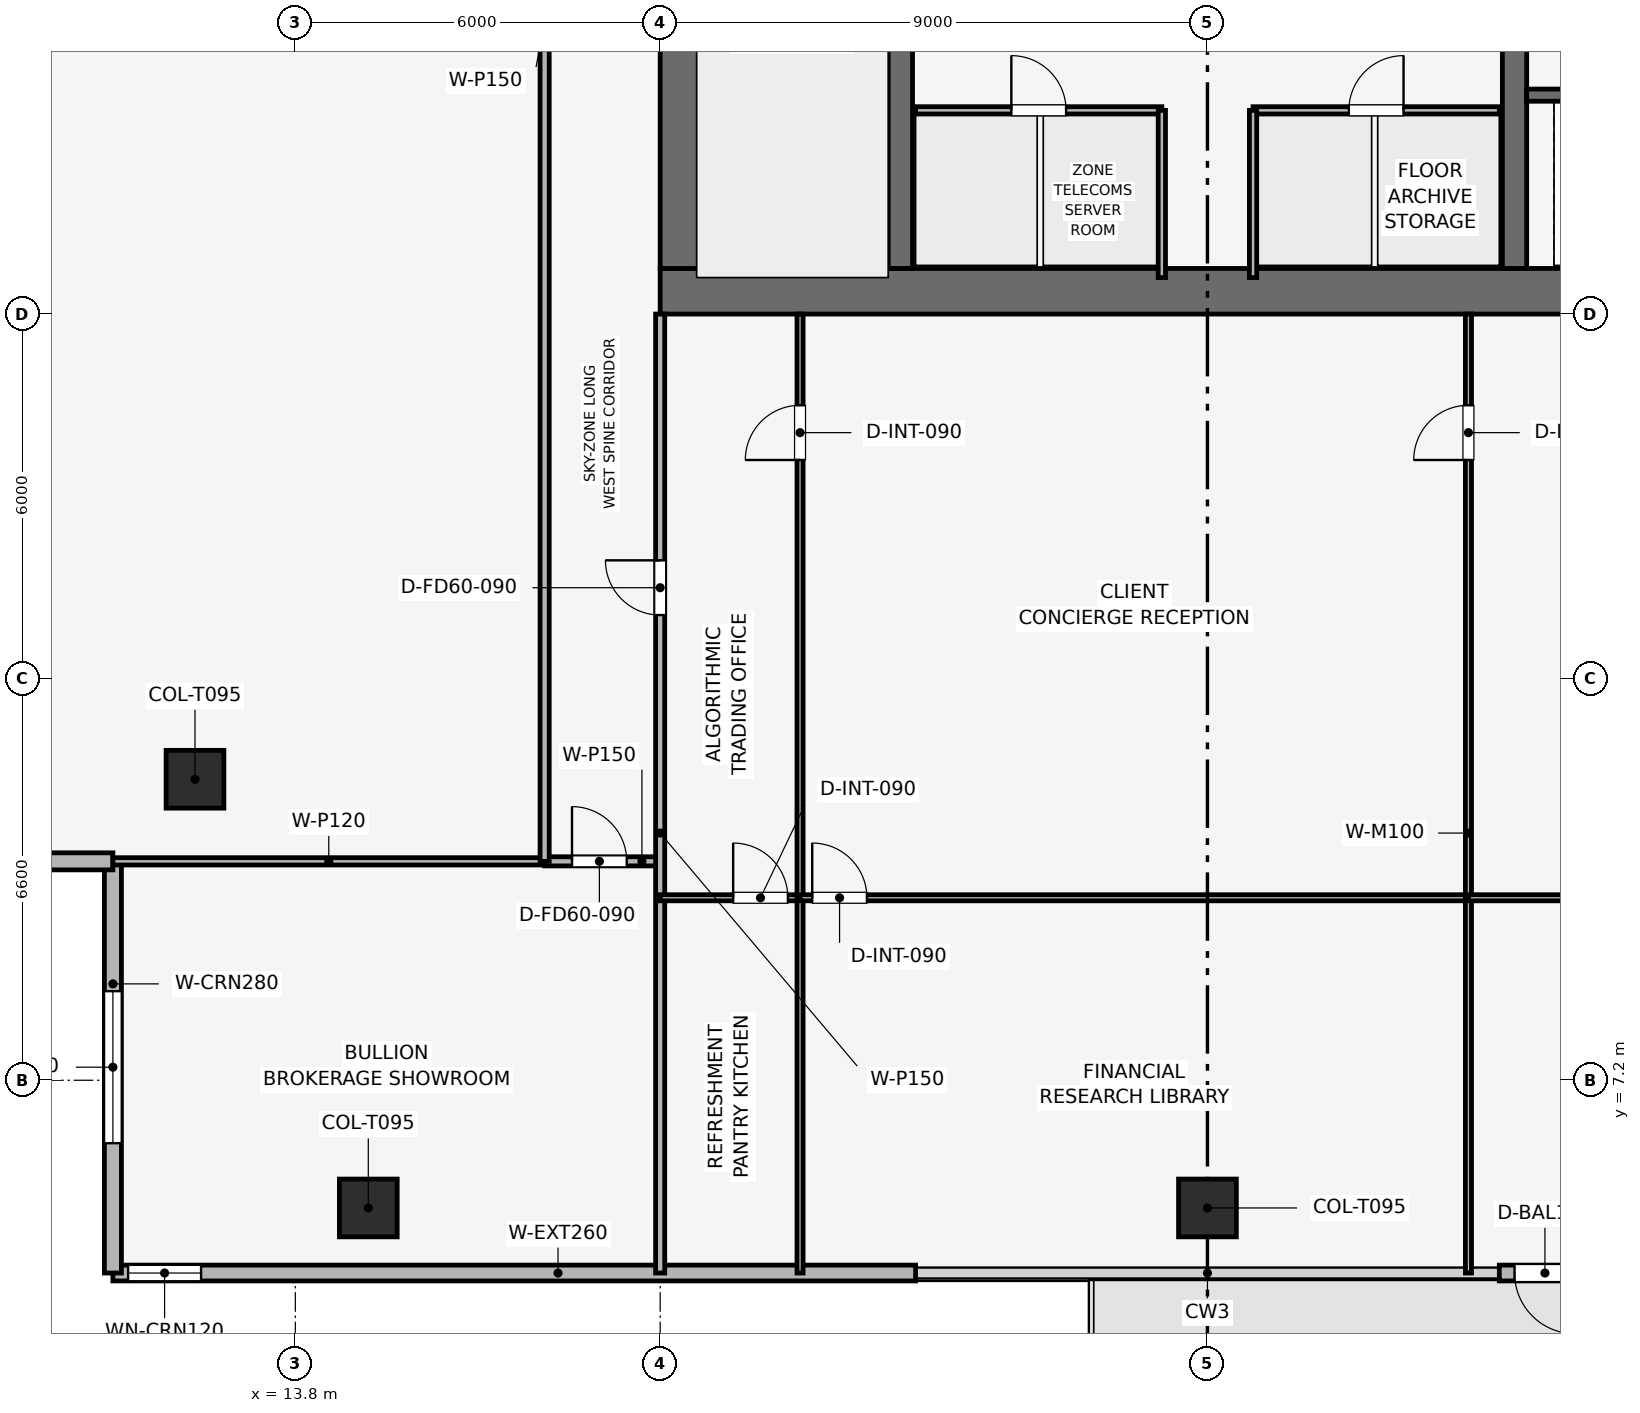
"""IFC4 building model, lengths in metres.
Left out: names, types, materials, properties, quantities, classifications, styles, units other than length and angle.
Written with IfcOpenShell. Run it as: python <this file> out.ifc"""

import sys

from ifc_helpers import new_model, si_unit, direction, frame, frame_2d, origin, origin_2d, place, context, subcontext, project, spatial, rectangle, extrude, element, fill, save


model = new_model("IFC4")
c1 = context("Model", 3, precision=1e-05, world=origin(), true_north=direction((0.0, 1.0)))
c2 = subcontext(c1, "Body", "Model", "MODEL_VIEW")
j1 = project(units=[si_unit("LENGTHUNIT", "METRE"), si_unit("PLANEANGLEUNIT", "RADIAN")], contexts=[c1])
p1 = place(None, origin())
s1 = spatial("IfcSite", under=j1, at=p1, CompositionType="ELEMENT")
p2 = place(p1, origin())
s2 = spatial("IfcBuilding", under=s1, at=p2, CompositionType="ELEMENT")
p3 = place(p2, frame((0.0, 0.0, 250.35)))
s3 = spatial("IfcBuildingStorey", under=s2, at=p3, CompositionType="ELEMENT", Elevation=250.35)
p4 = place(p3, frame((19.8, 20.175, 0.0), z_axis=(0.0, 0.0, 1.0), x_axis=(1.0, 0.0, 0.0)))
e1 = element("IfcWall", 1, at=p4, inside=s3, PredefinedType="SHEAR", context=c2, shape_type="SweptSolid", body=[
    extrude(rectangle(XDim=18.0, YDim=0.75, at=frame_2d((9.0, 0.0))), origin(), (0.0, 0.0, 1.0), 3.75),
])
p5 = place(p3, frame((20.175, 20.55, 0.0), z_axis=(0.0, 0.0, 1.0), x_axis=(0.0, 1.0, 0.0)))
e2 = element("IfcWall", 2, at=p5, inside=s3, PredefinedType="SHEAR", context=c2, shape_type="SweptSolid", body=[
    extrude(rectangle(XDim=16.5, YDim=0.75, at=frame_2d((8.25, 0.0))), origin(), (0.0, 0.0, 1.0), 3.75),
])
p6 = place(p5, frame((10.25, 0.0, 0.0)))
e3 = element("IfcOpeningElement", 3, at=p6, cuts=e2, PredefinedType="OPENING", context=c2, shape_type="SweptSolid", body=[
    extrude(rectangle(XDim=1.1, YDim=2.15, at=frame_2d((0.55, 1.075))), frame((0.0, 0.385, 0.0), z_axis=(0.0, -1.0, 0.0), x_axis=(1.0, 0.0, 0.0)), (0.0, 0.0, 1.0), 0.77),
])
for number, where, z_axis, x_axis in (
    (4, (23.75, 20.55, 0.0), (0.0, 0.0, 1.0), (0.0, 1.0, 0.0)),
    (5, (33.85, 20.55, 0.0), (0.0, 0.0, 1.0), (0.0, 1.0, 0.0)),
):
    element("IfcWall", number, at=place(p3, frame(where, z_axis=z_axis, x_axis=x_axis)), inside=s3, PredefinedType="SHEAR", context=c2, shape_type="SweptSolid", body=[
        extrude(rectangle(XDim=16.5, YDim=0.4, at=frame_2d((8.25, 0.0))), origin(), (0.0, 0.0, 1.0), 3.75),
    ])
for number, where, z_axis, x_axis in (
    (6, (15.0, 5.1, 0.003), (0.0, 0.0, 1.0), (1.0, 0.0, 0.0)),
    (7, (28.8, 5.1, 0.003), (0.0, 0.0, 1.0), (1.0, 0.0, 0.0)),
    (8, (12.15, 12.15, 0.003), (0.0, 0.0, 1.0), (1.0, 0.0, 0.0)),
):
    element("IfcColumn", number, at=place(p3, frame(where, z_axis=z_axis, x_axis=x_axis)), inside=s3, PredefinedType="COLUMN", context=c2, shape_type="SweptSolid", body=[
        extrude(rectangle(XDim=0.95, YDim=0.95, at=origin_2d()), origin(), (0.0, 0.0, 1.0), 3.494),
    ])
p7 = place(p3, frame((46.8, 4.03, 0.0), z_axis=(0.0, 0.0, 1.0), x_axis=(-1.0, 0.0, 0.0)))
e9 = element("IfcWall", 9, at=p7, inside=s3, PredefinedType="SOLIDWALL", context=c2, shape_type="SweptSolid", body=[
    extrude(rectangle(XDim=13.2, YDim=0.26, at=frame_2d((6.6, 0.0))), origin(), (0.0, 0.0, 1.0), 3.5),
])
p8 = place(p7, frame((11.95, 0.0, 0.0)))
e10 = element("IfcOpeningElement", 10, at=p8, cuts=e9, PredefinedType="OPENING", context=c2, shape_type="SweptSolid", body=[
    extrude(rectangle(XDim=1.0, YDim=2.2, at=frame_2d((0.5, 1.1))), frame((0.0, 0.14, 0.0), z_axis=(0.0, -1.0, 0.0), x_axis=(1.0, 0.0, 0.0)), (0.0, 0.0, 1.0), 0.28),
])
p9 = place(p3, frame((24.0, 4.03, 0.0), z_axis=(0.0, 0.0, 1.0), x_axis=(-1.0, 0.0, 0.0)))
e11 = element("IfcWall", 11, at=p9, inside=s3, PredefinedType="SOLIDWALL", context=c2, shape_type="SweptSolid", body=[
    extrude(rectangle(XDim=13.2, YDim=0.26, at=frame_2d((6.6, 0.0))), origin(), (0.0, 0.0, 1.0), 3.5),
])
p10 = place(p9, frame((11.75, 0.0, 0.9)))
e12 = element("IfcOpeningElement", 12, at=p10, cuts=e11, PredefinedType="OPENING", context=c2, shape_type="SweptSolid", body=[
    extrude(rectangle(XDim=1.2, YDim=2.1, at=frame_2d((0.6, 1.05))), frame((0.0, 0.14, 0.0), z_axis=(0.0, -1.0, 0.0), x_axis=(1.0, 0.0, 0.0)), (0.0, 0.0, 1.0), 0.28),
])
p11 = place(p3, frame((10.8, 4.03, 0.0), z_axis=(0.0, 0.0, 1.0), x_axis=(0.0, 1.0, 0.0)))
e13 = element("IfcWall", 13, at=p11, inside=s3, PredefinedType="SOLIDWALL", context=c2, shape_type="SweptSolid", body=[
    extrude(rectangle(XDim=6.77, YDim=0.28, at=frame_2d((3.385, 0.0))), origin(), (0.0, 0.0, 1.0), 3.5),
])
p12 = place(p11, frame((2.135, 0.0, 0.9)))
e14 = element("IfcOpeningElement", 14, at=p12, cuts=e13, PredefinedType="OPENING", context=c2, shape_type="SweptSolid", body=[
    extrude(rectangle(XDim=2.5, YDim=1.9, at=frame_2d((1.25, 0.95))), frame((0.0, 0.15, 0.0), z_axis=(0.0, -1.0, 0.0), x_axis=(1.0, 0.0, 0.0)), (0.0, 0.0, 1.0), 0.3),
])
p13 = place(p3, frame((10.8, 10.8, 0.0), z_axis=(0.0, 0.0, 1.0), x_axis=(-1.0, 0.0, 0.0)))
e15 = element("IfcWall", 15, at=p13, inside=s3, PredefinedType="SOLIDWALL", context=c2, shape_type="SweptSolid", body=[
    extrude(rectangle(XDim=6.77, YDim=0.28, at=frame_2d((3.385, 0.0))), origin(), (0.0, 0.0, 1.0), 3.5),
])
p14 = place(p13, frame((2.135, 0.0, 0.9)))
e16 = element("IfcOpeningElement", 16, at=p14, cuts=e15, PredefinedType="OPENING", context=c2, shape_type="SweptSolid", body=[
    extrude(rectangle(XDim=2.5, YDim=1.9, at=frame_2d((1.25, 0.95))), frame((0.0, 0.15, 0.0), z_axis=(0.0, -1.0, 0.0), x_axis=(1.0, 0.0, 0.0)), (0.0, 0.0, 1.0), 0.3),
])
p15 = place(p3, frame((34.05, 23.4, 0.0), z_axis=(0.0, 0.0, 1.0), x_axis=(1.0, 0.0, 0.0)))
e17 = element("IfcWall", 17, at=p15, inside=s3, PredefinedType="SHEAR", context=c2, shape_type="SweptSolid", body=[
    extrude(rectangle(XDim=3.05, YDim=0.2, at=frame_2d((1.525, 0.0))), origin(), (0.0, 0.0, 1.0), 3.5),
])
p16 = place(p15, frame((1.2, 0.0, 0.0)))
e18 = element("IfcOpeningElement", 18, at=p16, cuts=e17, PredefinedType="OPENING", context=c2, shape_type="SweptSolid", body=[
    extrude(rectangle(XDim=1.1, YDim=2.15, at=frame_2d((0.55, 1.075))), frame((0.0, 0.11, 0.0), z_axis=(0.0, -1.0, 0.0), x_axis=(1.0, 0.0, 0.0)), (0.0, 0.0, 1.0), 0.22),
])
p17 = place(p3, frame((24.0, 23.15, 0.0), z_axis=(0.0, 0.0, 1.0), x_axis=(1.0, 0.0, 0.0)))
e19 = element("IfcWall", 19, at=p17, inside=s3, PredefinedType="PARTITIONING", context=c2, shape_type="SweptSolid", body=[
    extrude(rectangle(XDim=4.05, YDim=0.12, at=frame_2d((2.025, 0.0))), origin(), (0.0, 0.0, 1.0), 3.5),
])
p18 = place(p17, frame((1.575, 0.0, 0.0)))
e20 = element("IfcOpeningElement", 20, at=p18, cuts=e19, PredefinedType="OPENING", context=c2, shape_type="SweptSolid", body=[
    extrude(rectangle(XDim=0.9, YDim=2.1, at=frame_2d((0.45, 1.05))), frame((0.0, 0.07, 0.0), z_axis=(0.0, -1.0, 0.0), x_axis=(1.0, 0.0, 0.0)), (0.0, 0.0, 1.0), 0.14),
])
p19 = place(p3, frame((28.05, 20.4, 0.0), z_axis=(0.0, 0.0, 1.0), x_axis=(0.0, 1.0, 0.0)))
e21 = element("IfcWall", 21, at=p19, inside=s3, PredefinedType="PARTITIONING", context=c2, shape_type="SweptSolid", body=[
    extrude(rectangle(XDim=2.75, YDim=0.12, at=frame_2d((1.375, 0.0))), origin(), (0.0, 0.0, 1.0), 3.5),
])
p20 = place(p3, frame((29.55, 23.15, 0.0), z_axis=(0.0, 0.0, 1.0), x_axis=(1.0, 0.0, 0.0)))
e22 = element("IfcWall", 22, at=p20, inside=s3, PredefinedType="PARTITIONING", context=c2, shape_type="SweptSolid", body=[
    extrude(rectangle(XDim=4.05, YDim=0.12, at=frame_2d((2.025, 0.0))), origin(), (0.0, 0.0, 1.0), 3.5),
])
p21 = place(p20, frame((1.575, 0.0, 0.0)))
e23 = element("IfcOpeningElement", 23, at=p21, cuts=e22, PredefinedType="OPENING", context=c2, shape_type="SweptSolid", body=[
    extrude(rectangle(XDim=0.9, YDim=2.1, at=frame_2d((0.45, 1.05))), frame((0.0, 0.07, 0.0), z_axis=(0.0, -1.0, 0.0), x_axis=(1.0, 0.0, 0.0)), (0.0, 0.0, 1.0), 0.14),
])
p22 = place(p3, frame((29.55, 20.4, 0.0), z_axis=(0.0, 0.0, 1.0), x_axis=(0.0, 1.0, 0.0)))
e24 = element("IfcWall", 24, at=p22, inside=s3, PredefinedType="PARTITIONING", context=c2, shape_type="SweptSolid", body=[
    extrude(rectangle(XDim=2.75, YDim=0.12, at=frame_2d((1.375, 0.0))), origin(), (0.0, 0.0, 1.0), 3.5),
])
p23 = place(p3, frame((10.8, 10.8, 0.0), z_axis=(0.0, 0.0, 1.0), x_axis=(1.0, 0.0, 0.0)))
e25 = element("IfcWall", 25, at=p23, inside=s3, PredefinedType="PARTITIONING", context=c2, shape_type="SweptSolid", body=[
    extrude(rectangle(XDim=7.1, YDim=0.12, at=frame_2d((3.55, 0.0))), origin(), (0.0, 0.0, 1.0), 3.085),
])
p24 = place(p3, frame((17.9, 10.8, 0.0), z_axis=(0.0, 0.0, 1.0), x_axis=(1.0, 0.0, 0.0)))
e26 = element("IfcWall", 26, at=p24, inside=s3, PredefinedType="PARTITIONING", context=c2, shape_type="SweptSolid", body=[
    extrude(rectangle(XDim=1.9, YDim=0.15, at=frame_2d((0.95, 0.0))), origin(), (0.0, 0.0, 1.0), 3.5),
])
p25 = place(p24, frame((0.45, 0.0, 0.0)))
e27 = element("IfcOpeningElement", 27, at=p25, cuts=e26, PredefinedType="OPENING", context=c2, shape_type="SweptSolid", body=[
    extrude(rectangle(XDim=0.9, YDim=2.1, at=frame_2d((0.45, 1.05))), frame((0.0, 0.085, 0.0), z_axis=(0.0, -1.0, 0.0), x_axis=(1.0, 0.0, 0.0)), (0.0, 0.0, 1.0), 0.17),
])
p26 = place(p3, frame((19.8, 4.03, 0.0), z_axis=(0.0, 0.0, 1.0), x_axis=(0.0, 1.0, 0.0)))
e28 = element("IfcWall", 28, at=p26, inside=s3, PredefinedType="PARTITIONING", context=c2, shape_type="SweptSolid", body=[
    extrude(rectangle(XDim=15.77, YDim=0.15, at=frame_2d((7.885, 0.0))), origin(), (0.0, 0.0, 1.0), 3.085),
])
p27 = place(p26, frame((10.82, 0.0, 0.0)))
e29 = element("IfcOpeningElement", 29, at=p27, cuts=e28, PredefinedType="OPENING", context=c2, shape_type="SweptSolid", body=[
    extrude(rectangle(XDim=0.9, YDim=2.1, at=frame_2d((0.45, 1.05))), frame((0.0, 0.085, 0.0), z_axis=(0.0, -1.0, 0.0), x_axis=(1.0, 0.0, 0.0)), (0.0, 0.0, 1.0), 0.17),
])
p28 = place(p3, frame((19.8, 10.201, 0.0), z_axis=(0.0, 0.0, 1.0), x_axis=(1.0, 0.0, 0.0)))
e30 = element("IfcWall", 30, at=p28, inside=s3, PredefinedType="MOVABLE", context=c2, shape_type="SweptSolid", body=[
    extrude(rectangle(XDim=2.3, YDim=0.1, at=frame_2d((1.15, 0.0))), origin(), (0.0, 0.0, 1.0), 3.085),
])
p29 = place(p28, frame((1.2, 0.0, 0.0)))
e31 = element("IfcOpeningElement", 31, at=p29, cuts=e30, PredefinedType="OPENING", context=c2, shape_type="SweptSolid", body=[
    extrude(rectangle(XDim=0.9, YDim=2.1, at=frame_2d((0.45, 1.05))), frame((0.0, 0.06, 0.0), z_axis=(0.0, -1.0, 0.0), x_axis=(1.0, 0.0, 0.0)), (0.0, 0.0, 1.0), 0.12),
])
p30 = place(p3, frame((22.1, 4.03, 0.0), z_axis=(0.0, 0.0, 1.0), x_axis=(0.0, 1.0, 0.0)))
e32 = element("IfcWall", 32, at=p30, inside=s3, PredefinedType="MOVABLE", context=c2, shape_type="SweptSolid", body=[
    extrude(rectangle(XDim=15.77, YDim=0.1, at=frame_2d((7.885, 0.0))), origin(), (0.0, 0.0, 1.0), 3.085),
])
p31 = place(p30, frame((13.37, 0.0, 0.0)))
e33 = element("IfcOpeningElement", 33, at=p31, cuts=e32, PredefinedType="OPENING", context=c2, shape_type="SweptSolid", body=[
    extrude(rectangle(XDim=0.9, YDim=2.1, at=frame_2d((0.45, 1.05))), frame((0.0, 0.06, 0.0), z_axis=(0.0, -1.0, 0.0), x_axis=(1.0, 0.0, 0.0)), (0.0, 0.0, 1.0), 0.12),
])
p32 = place(p3, frame((22.1, 10.201, 0.0), z_axis=(0.0, 0.0, 1.0), x_axis=(1.0, 0.0, 0.0)))
e34 = element("IfcWall", 34, at=p32, inside=s3, PredefinedType="MOVABLE", context=c2, shape_type="SweptSolid", body=[
    extrude(rectangle(XDim=10.992, YDim=0.1, at=frame_2d((5.496, 0.0))), origin(), (0.0, 0.0, 1.0), 3.085),
])
p33 = place(p32, frame((0.2, 0.0, 0.0)))
e35 = element("IfcOpeningElement", 35, at=p33, cuts=e34, PredefinedType="OPENING", context=c2, shape_type="SweptSolid", body=[
    extrude(rectangle(XDim=0.9, YDim=2.1, at=frame_2d((0.45, 1.05))), frame((0.0, 0.06, 0.0), z_axis=(0.0, -1.0, 0.0), x_axis=(1.0, 0.0, 0.0)), (0.0, 0.0, 1.0), 0.12),
])
p34 = place(p3, frame((33.092, 4.03, 0.0), z_axis=(0.0, 0.0, 1.0), x_axis=(0.0, 1.0, 0.0)))
e36 = element("IfcWall", 36, at=p34, inside=s3, PredefinedType="MOVABLE", context=c2, shape_type="SweptSolid", body=[
    extrude(rectangle(XDim=15.77, YDim=0.1, at=frame_2d((7.885, 0.0))), origin(), (0.0, 0.0, 1.0), 3.085),
])
p35 = place(p34, frame((13.37, 0.0, 0.0)))
e37 = element("IfcOpeningElement", 37, at=p35, cuts=e36, PredefinedType="OPENING", context=c2, shape_type="SweptSolid", body=[
    extrude(rectangle(XDim=0.9, YDim=2.1, at=frame_2d((0.45, 1.05))), frame((0.0, 0.06, 0.0), z_axis=(0.0, -1.0, 0.0), x_axis=(1.0, 0.0, 0.0)), (0.0, 0.0, 1.0), 0.12),
])
p36 = place(p3, frame((33.092, 10.201, 0.0), z_axis=(0.0, 0.0, 1.0), x_axis=(1.0, 0.0, 0.0)))
e38 = element("IfcWall", 38, at=p36, inside=s3, PredefinedType="MOVABLE", context=c2, shape_type="SweptSolid", body=[
    extrude(rectangle(XDim=13.708, YDim=0.1, at=frame_2d((6.854, 0.0))), origin(), (0.0, 0.0, 1.0), 3.085),
])
p37 = place(p36, frame((2.268, 0.0, 0.0)))
e39 = element("IfcOpeningElement", 39, at=p37, cuts=e38, PredefinedType="OPENING", context=c2, shape_type="SweptSolid", body=[
    extrude(rectangle(XDim=0.9, YDim=2.1, at=frame_2d((0.45, 1.05))), frame((0.0, 0.06, 0.0), z_axis=(0.0, -1.0, 0.0), x_axis=(1.0, 0.0, 0.0)), (0.0, 0.0, 1.0), 0.12),
])
p38 = place(p3, frame((17.9, 10.8, 0.0), z_axis=(0.0, 0.0, 1.0), x_axis=(0.0, 1.0, 0.0)))
e40 = element("IfcWall", 40, at=p38, inside=s3, PredefinedType="PARTITIONING", context=c2, shape_type="SweptSolid", body=[
    extrude(rectangle(XDim=28.9, YDim=0.15, at=frame_2d((14.45, 0.0))), origin(), (0.0, 0.0, 1.0), 3.085),
])
p39 = place(p38, frame((14.0, 0.0, 0.0)))
e41 = element("IfcOpeningElement", 41, at=p39, cuts=e40, PredefinedType="OPENING", context=c2, shape_type="SweptSolid", body=[
    extrude(rectangle(XDim=0.9, YDim=2.1, at=frame_2d((0.45, 1.05))), frame((0.0, 0.085, 0.0), z_axis=(0.0, -1.0, 0.0), x_axis=(1.0, 0.0, 0.0)), (0.0, 0.0, 1.0), 0.17),
])
p40 = place(p8, origin())
e42 = element("IfcDoor", 42, at=p40, inside=s3, OperationType="SINGLE_SWING_LEFT", PredefinedType="DOOR", context=c2, shape_type="SweptSolid", body=[
    extrude(rectangle(XDim=1.0, YDim=2.2, at=frame_2d((0.5, 1.1))), frame((0.0, 0.025, 0.0), z_axis=(0.0, -1.0, 0.0), x_axis=(1.0, 0.0, 0.0)), (0.0, 0.0, 1.0), 0.05),
])
fill(e10, e42)
p41 = place(p10, origin())
e43 = element("IfcWindow", 43, at=p41, inside=s3, PartitioningType="SINGLE_PANEL", PredefinedType="WINDOW", context=c2, shape_type="SweptSolid", body=[
    extrude(rectangle(XDim=1.2, YDim=2.1, at=frame_2d((0.6, 1.05))), frame((0.0, 0.03, 0.0), z_axis=(0.0, -1.0, 0.0), x_axis=(1.0, 0.0, 0.0)), (0.0, 0.0, 1.0), 0.06),
])
fill(e12, e43)
p42 = place(p12, origin())
e44 = element("IfcWindow", 44, at=p42, inside=s3, PartitioningType="SINGLE_PANEL", PredefinedType="WINDOW", context=c2, shape_type="SweptSolid", body=[
    extrude(rectangle(XDim=2.5, YDim=1.9, at=frame_2d((1.25, 0.95))), frame((0.0, 0.03, 0.0), z_axis=(0.0, -1.0, 0.0), x_axis=(1.0, 0.0, 0.0)), (0.0, 0.0, 1.0), 0.06),
])
fill(e14, e44)
p43 = place(p18, origin())
e45 = element("IfcDoor", 45, at=p43, inside=s3, OperationType="SINGLE_SWING_LEFT", PredefinedType="DOOR", context=c2, shape_type="SweptSolid", body=[
    extrude(rectangle(XDim=0.9, YDim=2.1, at=frame_2d((0.45, 1.05))), frame((0.0, 0.025, 0.0), z_axis=(0.0, -1.0, 0.0), x_axis=(1.0, 0.0, 0.0)), (0.0, 0.0, 1.0), 0.05),
])
fill(e20, e45)
p44 = place(p21, origin())
e46 = element("IfcDoor", 46, at=p44, inside=s3, OperationType="SINGLE_SWING_RIGHT", PredefinedType="DOOR", context=c2, shape_type="SweptSolid", body=[
    extrude(rectangle(XDim=0.9, YDim=2.1, at=frame_2d((0.45, 1.05))), frame((0.0, 0.025, 0.0), z_axis=(0.0, -1.0, 0.0), x_axis=(1.0, 0.0, 0.0)), (0.0, 0.0, 1.0), 0.05),
])
fill(e23, e46)
p45 = place(p25, origin())
e47 = element("IfcDoor", 47, at=p45, inside=s3, OperationType="SINGLE_SWING_LEFT", PredefinedType="DOOR", context=c2, shape_type="SweptSolid", body=[
    extrude(rectangle(XDim=0.9, YDim=2.1, at=frame_2d((0.45, 1.05))), frame((0.0, 0.025, 0.0), z_axis=(0.0, -1.0, 0.0), x_axis=(1.0, 0.0, 0.0)), (0.0, 0.0, 1.0), 0.05),
])
fill(e27, e47)
p46 = place(p27, origin())
e48 = element("IfcDoor", 48, at=p46, inside=s3, OperationType="SINGLE_SWING_RIGHT", PredefinedType="DOOR", context=c2, shape_type="SweptSolid", body=[
    extrude(rectangle(XDim=0.9, YDim=2.1, at=frame_2d((0.45, 1.05))), frame((0.0, 0.025, 0.0), z_axis=(0.0, -1.0, 0.0), x_axis=(1.0, 0.0, 0.0)), (0.0, 0.0, 1.0), 0.05),
])
fill(e29, e48)
p47 = place(p29, origin())
e49 = element("IfcDoor", 49, at=p47, inside=s3, OperationType="SINGLE_SWING_LEFT", PredefinedType="DOOR", context=c2, shape_type="SweptSolid", body=[
    extrude(rectangle(XDim=0.9, YDim=2.1, at=frame_2d((0.45, 1.05))), frame((0.0, 0.025, 0.0), z_axis=(0.0, -1.0, 0.0), x_axis=(1.0, 0.0, 0.0)), (0.0, 0.0, 1.0), 0.05),
])
fill(e31, e49)
p48 = place(p31, origin())
e50 = element("IfcDoor", 50, at=p48, inside=s3, OperationType="SINGLE_SWING_LEFT", PredefinedType="DOOR", context=c2, shape_type="SweptSolid", body=[
    extrude(rectangle(XDim=0.9, YDim=2.1, at=frame_2d((0.45, 1.05))), frame((0.0, 0.025, 0.0), z_axis=(0.0, -1.0, 0.0), x_axis=(1.0, 0.0, 0.0)), (0.0, 0.0, 1.0), 0.05),
])
fill(e33, e50)
p49 = place(p33, origin())
e51 = element("IfcDoor", 51, at=p49, inside=s3, OperationType="SINGLE_SWING_LEFT", PredefinedType="DOOR", context=c2, shape_type="SweptSolid", body=[
    extrude(rectangle(XDim=0.9, YDim=2.1, at=frame_2d((0.45, 1.05))), frame((0.0, 0.025, 0.0), z_axis=(0.0, -1.0, 0.0), x_axis=(1.0, 0.0, 0.0)), (0.0, 0.0, 1.0), 0.05),
])
fill(e35, e51)
p50 = place(p35, origin())
e52 = element("IfcDoor", 52, at=p50, inside=s3, OperationType="SINGLE_SWING_LEFT", PredefinedType="DOOR", context=c2, shape_type="SweptSolid", body=[
    extrude(rectangle(XDim=0.9, YDim=2.1, at=frame_2d((0.45, 1.05))), frame((0.0, 0.025, 0.0), z_axis=(0.0, -1.0, 0.0), x_axis=(1.0, 0.0, 0.0)), (0.0, 0.0, 1.0), 0.05),
])
fill(e37, e52)
save(model, sys.argv[1])
